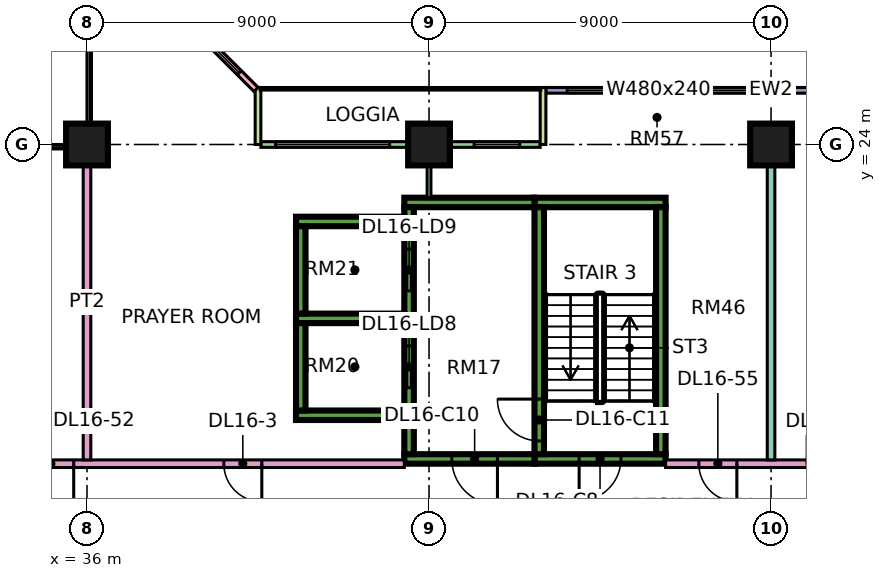
"""IFC4 building model, lengths in metres.
Left out: names, types, materials, properties, quantities, classifications, styles, units other than length and angle.
Written with IfcOpenShell. Run it as: python <this file> out.ifc"""

import sys

from ifc_helpers import new_model, si_unit, direction, frame, frame_2d, origin, origin_2d, place, context, subcontext, project, spatial, rectangle, extrude, element, fill, save


model = new_model("IFC4")
c1 = context("Model", 3, precision=1e-05, world=origin(), true_north=direction((0.0, 1.0)))
c2 = subcontext(c1, "Body", "Model", "MODEL_VIEW")
j1 = project(units=[si_unit("LENGTHUNIT", "METRE"), si_unit("PLANEANGLEUNIT", "RADIAN")], contexts=[c1])
p1 = place(None, origin())
s1 = spatial("IfcSite", under=j1, at=p1, CompositionType="ELEMENT")
p2 = place(p1, origin())
s2 = spatial("IfcBuilding", under=s1, at=p2, CompositionType="ELEMENT")
p3 = place(p2, frame((0.0, 0.0, 75.15)))
s3 = spatial("IfcBuildingStorey", under=s2, at=p3, CompositionType="ELEMENT", Elevation=75.15)
for number, where, z_axis, x_axis in (
    (1, (36.0, 24.0, 0.0), (0.0, 0.0, 1.0), (1.0, 0.0, 0.0)),
    (2, (45.0, 24.0, 0.0), (0.0, 0.0, 1.0), (1.0, 0.0, 0.0)),
    (3, (54.0, 24.0, 0.0), (0.0, 0.0, 1.0), (1.0, 0.0, 0.0)),
):
    element("IfcColumn", number, at=place(p3, frame(where, z_axis=z_axis, x_axis=x_axis)), inside=s3, PredefinedType="COLUMN", context=c2, shape_type="SweptSolid", body=[
        extrude(rectangle(XDim=1.1, YDim=1.1, at=origin_2d()), origin(), (0.0, 0.0, 1.0), 3.75),
    ])
p4 = place(p3, frame((47.775, 15.725, 0.0), z_axis=(0.0, 0.0, 1.0), x_axis=(1.0, 0.0, 0.0)))
e4 = element("IfcWall", 4, at=p4, inside=s3, PredefinedType="SHEAR", context=c2, shape_type="SweptSolid", body=[
    extrude(rectangle(XDim=3.45, YDim=0.25, at=frame_2d((1.725, 0.0))), origin(), (0.0, 0.0, 1.0), 3.75),
])
p5 = place(p4, frame((1.175, 0.0, 0.0)))
e5 = element("IfcOpeningElement", 5, at=p5, cuts=e4, PredefinedType="OPENING", context=c2, shape_type="SweptSolid", body=[
    extrude(rectangle(XDim=1.1, YDim=2.2, at=frame_2d((0.55, 1.1))), frame((0.0, 0.135, 0.0), z_axis=(0.0, -1.0, 0.0), x_axis=(1.0, 0.0, 0.0)), (0.0, 0.0, 1.0), 0.27),
])
p6 = place(p3, frame((47.775, 22.475, 0.0), z_axis=(0.0, 0.0, 1.0), x_axis=(1.0, 0.0, 0.0)))
e6 = element("IfcWall", 6, at=p6, inside=s3, PredefinedType="SHEAR", context=c2, shape_type="SweptSolid", body=[
    extrude(rectangle(XDim=3.45, YDim=0.25, at=frame_2d((1.725, 0.0))), origin(), (0.0, 0.0, 1.0), 3.75),
])
p7 = place(p3, frame((47.9, 15.85, 0.0), z_axis=(0.0, 0.0, 1.0), x_axis=(0.0, 1.0, 0.0)))
e7 = element("IfcWall", 7, at=p7, inside=s3, PredefinedType="SHEAR", context=c2, shape_type="SweptSolid", body=[
    extrude(rectangle(XDim=6.5, YDim=0.25, at=frame_2d((3.25, 0.0))), origin(), (0.0, 0.0, 1.0), 3.75),
])
p8 = place(p7, frame((0.35, 0.0, 0.0)))
e8 = element("IfcOpeningElement", 8, at=p8, cuts=e7, PredefinedType="OPENING", context=c2, shape_type="SweptSolid", body=[
    extrude(rectangle(XDim=1.1, YDim=2.2, at=frame_2d((0.55, 1.1))), frame((0.0, 0.135, 0.0), z_axis=(0.0, -1.0, 0.0), x_axis=(1.0, 0.0, 0.0)), (0.0, 0.0, 1.0), 0.27),
])
p9 = place(p3, frame((51.1, 15.85, 0.0), z_axis=(0.0, 0.0, 1.0), x_axis=(0.0, 1.0, 0.0)))
e9 = element("IfcWall", 9, at=p9, inside=s3, PredefinedType="SHEAR", context=c2, shape_type="SweptSolid", body=[
    extrude(rectangle(XDim=6.5, YDim=0.25, at=frame_2d((3.25, 0.0))), origin(), (0.0, 0.0, 1.0), 3.75),
])
p10 = place(p3, frame((44.35, 15.725, 0.0), z_axis=(0.0, 0.0, 1.0), x_axis=(1.0, 0.0, 0.0)))
e10 = element("IfcWall", 10, at=p10, inside=s3, PredefinedType="SHEAR", context=c2, shape_type="SweptSolid", body=[
    extrude(rectangle(XDim=3.425, YDim=0.25, at=frame_2d((1.712, 0.0))), origin(), (0.0, 0.0, 1.0), 3.75),
])
p11 = place(p10, frame((1.25, 0.0, 0.0)))
e11 = element("IfcOpeningElement", 11, at=p11, cuts=e10, PredefinedType="OPENING", context=c2, shape_type="SweptSolid", body=[
    extrude(rectangle(XDim=1.2, YDim=2.2, at=frame_2d((0.6, 1.1))), frame((0.0, 0.135, 0.0), z_axis=(0.0, -1.0, 0.0), x_axis=(1.0, 0.0, 0.0)), (0.0, 0.0, 1.0), 0.27),
])
p12 = place(p3, frame((44.35, 22.475, 0.0), z_axis=(0.0, 0.0, 1.0), x_axis=(1.0, 0.0, 0.0)))
e12 = element("IfcWall", 12, at=p12, inside=s3, PredefinedType="SHEAR", context=c2, shape_type="SweptSolid", body=[
    extrude(rectangle(XDim=3.425, YDim=0.25, at=frame_2d((1.712, 0.0))), origin(), (0.0, 0.0, 1.0), 3.75),
])
p13 = place(p3, frame((44.475, 15.85, 0.0), z_axis=(0.0, 0.0, 1.0), x_axis=(0.0, 1.0, 0.0)))
e13 = element("IfcWall", 13, at=p13, inside=s3, PredefinedType="SHEAR", context=c2, shape_type="SweptSolid", body=[
    extrude(rectangle(XDim=6.5, YDim=0.25, at=frame_2d((3.25, 0.0))), origin(), (0.0, 0.0, 1.0), 3.75),
])
p14 = place(p13, frame((1.75, 0.0, 0.0)))
e14 = element("IfcOpeningElement", 14, at=p14, cuts=e13, PredefinedType="OPENING", context=c2, shape_type="SweptSolid", body=[
    extrude(rectangle(XDim=1.1, YDim=2.2, at=frame_2d((0.55, 1.1))), frame((0.0, 0.135, 0.0), z_axis=(0.0, -1.0, 0.0), x_axis=(1.0, 0.0, 0.0)), (0.0, 0.0, 1.0), 0.27),
])
p15 = place(p13, frame((4.3, 0.0, 0.0)))
e15 = element("IfcOpeningElement", 15, at=p15, cuts=e13, PredefinedType="OPENING", context=c2, shape_type="SweptSolid", body=[
    extrude(rectangle(XDim=1.1, YDim=2.2, at=frame_2d((0.55, 1.1))), frame((0.0, 0.135, 0.0), z_axis=(0.0, -1.0, 0.0), x_axis=(1.0, 0.0, 0.0)), (0.0, 0.0, 1.0), 0.27),
])
for number, where, z_axis, x_axis in (
    (16, (41.5, 16.875, 0.0), (0.0, 0.0, 1.0), (1.0, 0.0, 0.0)),
    (17, (41.5, 19.425, 0.0), (0.0, 0.0, 1.0), (1.0, 0.0, 0.0)),
    (18, (41.5, 21.975, 0.0), (0.0, 0.0, 1.0), (1.0, 0.0, 0.0)),
):
    element("IfcWall", number, at=place(p3, frame(where, z_axis=z_axis, x_axis=x_axis)), inside=s3, PredefinedType="SHEAR", context=c2, shape_type="SweptSolid", body=[
        extrude(rectangle(XDim=2.85, YDim=0.25, at=frame_2d((1.425, 0.0))), origin(), (0.0, 0.0, 1.0), 3.75),
    ])
for number, where, z_axis, x_axis in (
    (19, (41.625, 17.0, 0.0), (0.0, 0.0, 1.0), (0.0, 1.0, 0.0)),
    (20, (41.625, 19.55, 0.0), (0.0, 0.0, 1.0), (0.0, 1.0, 0.0)),
):
    element("IfcWall", number, at=place(p3, frame(where, z_axis=z_axis, x_axis=x_axis)), inside=s3, PredefinedType="SHEAR", context=c2, shape_type="SweptSolid", body=[
        extrude(rectangle(XDim=2.3, YDim=0.25, at=frame_2d((1.15, 0.0))), origin(), (0.0, 0.0, 1.0), 3.75),
    ])
p16 = place(p3, frame((59.925, 25.425, 0.0), z_axis=(0.0, 0.0, 1.0), x_axis=(-1.0, 0.0, 0.0)))
e21 = element("IfcWall", 21, at=p16, inside=s3, PredefinedType="SOLIDWALL", context=c2, shape_type="SweptSolid", body=[
    extrude(rectangle(XDim=11.85, YDim=0.15, at=frame_2d((5.925, 0.0))), origin(), (0.0, 0.0, 1.0), 3.35),
])
p17 = place(p16, frame((1.462, 0.0, 0.45)))
e22 = element("IfcOpeningElement", 22, at=p17, cuts=e21, PredefinedType="OPENING", context=c2, shape_type="SweptSolid", body=[
    extrude(rectangle(XDim=3.0, YDim=2.4, at=frame_2d((1.5, 1.2))), frame((0.0, 0.085, 0.0), z_axis=(0.0, -1.0, 0.0), x_axis=(1.0, 0.0, 0.0)), (0.0, 0.0, 1.0), 0.17),
])
p18 = place(p16, frame((6.488, 0.0, 0.45)))
e23 = element("IfcOpeningElement", 23, at=p18, cuts=e21, PredefinedType="OPENING", context=c2, shape_type="SweptSolid", body=[
    extrude(rectangle(XDim=4.8, YDim=2.4, at=frame_2d((2.4, 1.2))), frame((0.0, 0.085, 0.0), z_axis=(0.0, -1.0, 0.0), x_axis=(1.0, 0.0, 0.0)), (0.0, 0.0, 1.0), 0.17),
])
p19 = place(p3, frame((47.925, 24.0, 0.0), z_axis=(0.0, 0.0, 1.0), x_axis=(-1.0, 0.0, 0.0)))
e24 = element("IfcWall", 24, at=p19, inside=s3, PredefinedType="SOLIDWALL", context=c2, shape_type="SweptSolid", body=[
    extrude(rectangle(XDim=7.35, YDim=0.15, at=frame_2d((3.675, 0.0))), origin(), (0.0, 0.0, 1.0), 3.35),
])
p20 = place(p19, frame((0.538, 0.0, 0.45)))
e25 = element("IfcOpeningElement", 25, at=p20, cuts=e24, PredefinedType="OPENING", context=c2, shape_type="SweptSolid", body=[
    extrude(rectangle(XDim=1.2, YDim=2.4, at=frame_2d((0.6, 1.2))), frame((0.0, 0.085, 0.0), z_axis=(0.0, -1.0, 0.0), x_axis=(1.0, 0.0, 0.0)), (0.0, 0.0, 1.0), 0.17),
])
p21 = place(p19, frame((3.962, 0.0, 0.45)))
e26 = element("IfcOpeningElement", 26, at=p21, cuts=e24, PredefinedType="OPENING", context=c2, shape_type="SweptSolid", body=[
    extrude(rectangle(XDim=3.0, YDim=2.4, at=frame_2d((1.5, 1.2))), frame((0.0, 0.085, 0.0), z_axis=(0.0, -1.0, 0.0), x_axis=(1.0, 0.0, 0.0)), (0.0, 0.0, 1.0), 0.17),
])
for number, where, z_axis, x_axis in (
    (27, (48.0, 25.5, 0.0), (0.0, 0.0, 1.0), (0.0, -1.0, 0.0)),
    (28, (40.5, 25.5, 0.0), (0.0, 0.0, 1.0), (0.0, -1.0, 0.0)),
):
    element("IfcWall", number, at=place(p3, frame(where, z_axis=z_axis, x_axis=x_axis)), inside=s3, PredefinedType="SOLIDWALL", context=c2, shape_type="SweptSolid", body=[
        extrude(rectangle(XDim=1.5, YDim=0.15, at=frame_2d((0.75, 0.0))), origin(), (0.0, 0.0, 1.0), 3.35),
    ])
p22 = place(p3, frame((40.447, 25.447, 0.0), z_axis=(0.0, 0.0, 1.0), x_axis=(-0.707106781187, 0.707106781187, 0.0)))
e29 = element("IfcWall", 29, at=p22, inside=s3, PredefinedType="SOLIDWALL", context=c2, shape_type="SweptSolid", body=[
    extrude(rectangle(XDim=4.243, YDim=0.15, at=frame_2d((2.121, 0.0))), origin(), (0.0, 0.0, 1.0), 3.35),
])
p23 = place(p22, frame((0.621, 0.0, 0.45)))
e30 = element("IfcOpeningElement", 30, at=p23, cuts=e29, PredefinedType="OPENING", context=c2, shape_type="SweptSolid", body=[
    extrude(rectangle(XDim=3.0, YDim=2.4, at=frame_2d((1.5, 1.2))), frame((0.0, 0.085, 0.0), z_axis=(0.0, -1.0, 0.0), x_axis=(1.0, 0.0, 0.0)), (0.0, 0.0, 1.0), 0.17),
])
p24 = place(p3, frame((34.0, 15.6, 0.0), z_axis=(0.0, 0.0, 1.0), x_axis=(1.0, 0.0, 0.0)))
e31 = element("IfcWall", 31, at=p24, inside=s3, PredefinedType="PARTITIONING", context=c2, shape_type="SweptSolid", body=[
    extrude(rectangle(XDim=10.35, YDim=0.2, at=frame_2d((5.175, 0.0))), origin(), (0.0, 0.0, 1.0), 3.35),
])
p25 = place(p24, frame((5.6, 0.0, 0.0)))
e32 = element("IfcOpeningElement", 32, at=p25, cuts=e31, PredefinedType="OPENING", context=c2, shape_type="SweptSolid", body=[
    extrude(rectangle(XDim=1.0, YDim=2.1, at=frame_2d((0.5, 1.05))), frame((0.0, 0.11, 0.0), z_axis=(0.0, -1.0, 0.0), x_axis=(1.0, 0.0, 0.0)), (0.0, 0.0, 1.0), 0.22),
])
p26 = place(p24, frame((0.45, 0.0, 0.0)))
e33 = element("IfcOpeningElement", 33, at=p26, cuts=e31, PredefinedType="OPENING", context=c2, shape_type="SweptSolid", body=[
    extrude(rectangle(XDim=1.2, YDim=2.1, at=frame_2d((0.6, 1.05))), frame((0.0, 0.11, 0.0), z_axis=(0.0, -1.0, 0.0), x_axis=(1.0, 0.0, 0.0)), (0.0, 0.0, 1.0), 0.22),
])
p27 = place(p3, frame((36.0, 15.7, 0.0), z_axis=(0.0, 0.0, 1.0), x_axis=(0.0, 1.0, 0.0)))
e34 = element("IfcWall", 34, at=p27, inside=s3, PredefinedType="PARTITIONING", context=c2, shape_type="SweptSolid", body=[
    extrude(rectangle(XDim=8.3, YDim=0.2, at=frame_2d((4.15, 0.0))), origin(), (0.0, 0.0, 1.0), 3.35),
])
p28 = place(p3, frame((45.0, 22.6, 0.0), z_axis=(0.0, 0.0, 1.0), x_axis=(0.0, 1.0, 0.0)))
e35 = element("IfcWall", 35, at=p28, inside=s3, PredefinedType="PARTITIONING", context=c2, shape_type="SweptSolid", body=[
    extrude(rectangle(XDim=1.326, YDim=0.1, at=frame_2d((0.663, 0.0))), origin(), (0.0, 0.0, 1.0), 3.35),
])
p29 = place(p3, frame((51.225, 15.6, 0.0), z_axis=(0.0, 0.0, 1.0), x_axis=(1.0, 0.0, 0.0)))
e36 = element("IfcWall", 36, at=p29, inside=s3, PredefinedType="PARTITIONING", context=c2, shape_type="SweptSolid", body=[
    extrude(rectangle(XDim=20.701, YDim=0.2, at=frame_2d((10.351, 0.0))), origin(), (0.0, 0.0, 1.0), 3.35),
])
p30 = place(p29, frame((3.725, 0.0, 0.0)))
e37 = element("IfcOpeningElement", 37, at=p30, cuts=e36, PredefinedType="OPENING", context=c2, shape_type="SweptSolid", body=[
    extrude(rectangle(XDim=1.0, YDim=2.1, at=frame_2d((0.5, 1.05))), frame((0.0, 0.11, 0.0), z_axis=(0.0, -1.0, 0.0), x_axis=(1.0, 0.0, 0.0)), (0.0, 0.0, 1.0), 0.22),
])
p31 = place(p29, frame((0.875, 0.0, 0.0)))
e38 = element("IfcOpeningElement", 38, at=p31, cuts=e36, PredefinedType="OPENING", context=c2, shape_type="SweptSolid", body=[
    extrude(rectangle(XDim=1.0, YDim=2.1, at=frame_2d((0.5, 1.05))), frame((0.0, 0.11, 0.0), z_axis=(0.0, -1.0, 0.0), x_axis=(1.0, 0.0, 0.0)), (0.0, 0.0, 1.0), 0.22),
])
p32 = place(p3, frame((54.0, 15.7, 0.0), z_axis=(0.0, 0.0, 1.0), x_axis=(0.0, 1.0, 0.0)))
e39 = element("IfcWall", 39, at=p32, inside=s3, PredefinedType="PARTITIONING", context=c2, shape_type="SweptSolid", body=[
    extrude(rectangle(XDim=8.3, YDim=0.2, at=frame_2d((4.15, 0.0))), origin(), (0.0, 0.0, 1.0), 3.35),
])
p33 = place(p18, origin())
e40 = element("IfcWindow", 40, at=p33, inside=s3, PartitioningType="SINGLE_PANEL", PredefinedType="WINDOW", context=c2, shape_type="SweptSolid", body=[
    extrude(rectangle(XDim=4.8, YDim=2.4, at=frame_2d((2.4, 1.2))), frame((0.0, 0.03, 0.0), z_axis=(0.0, -1.0, 0.0), x_axis=(1.0, 0.0, 0.0)), (0.0, 0.0, 1.0), 0.06),
])
fill(e23, e40)
p34 = place(p20, origin())
e41 = element("IfcWindow", 41, at=p34, inside=s3, PartitioningType="SINGLE_PANEL", PredefinedType="WINDOW", context=c2, shape_type="SweptSolid", body=[
    extrude(rectangle(XDim=1.2, YDim=2.4, at=frame_2d((0.6, 1.2))), frame((0.0, 0.03, 0.0), z_axis=(0.0, -1.0, 0.0), x_axis=(1.0, 0.0, 0.0)), (0.0, 0.0, 1.0), 0.06),
])
fill(e25, e41)
p35 = place(p21, origin())
e42 = element("IfcWindow", 42, at=p35, inside=s3, PartitioningType="SINGLE_PANEL", PredefinedType="WINDOW", context=c2, shape_type="SweptSolid", body=[
    extrude(rectangle(XDim=3.0, YDim=2.4, at=frame_2d((1.5, 1.2))), frame((0.0, 0.03, 0.0), z_axis=(0.0, -1.0, 0.0), x_axis=(1.0, 0.0, 0.0)), (0.0, 0.0, 1.0), 0.06),
])
fill(e26, e42)
p36 = place(p23, origin())
e43 = element("IfcWindow", 43, at=p36, inside=s3, PartitioningType="SINGLE_PANEL", PredefinedType="WINDOW", context=c2, shape_type="SweptSolid", body=[
    extrude(rectangle(XDim=3.0, YDim=2.4, at=frame_2d((1.5, 1.2))), frame((0.0, 0.03, 0.0), z_axis=(0.0, -1.0, 0.0), x_axis=(1.0, 0.0, 0.0)), (0.0, 0.0, 1.0), 0.06),
])
fill(e30, e43)
p37 = place(p5, frame((1.1, 0.0, 0.0), z_axis=(0.0, 0.0, 1.0), x_axis=(-1.0, 0.0, 0.0)))
e44 = element("IfcDoor", 44, at=p37, inside=s3, OperationType="SINGLE_SWING_LEFT", PredefinedType="DOOR", context=c2, shape_type="SweptSolid", body=[
    extrude(rectangle(XDim=1.1, YDim=2.2, at=frame_2d((0.55, 1.1))), frame((0.0, 0.025, 0.0), z_axis=(0.0, -1.0, 0.0), x_axis=(1.0, 0.0, 0.0)), (0.0, 0.0, 1.0), 0.05),
])
fill(e5, e44)
p38 = place(p11, origin())
e45 = element("IfcDoor", 45, at=p38, inside=s3, OperationType="SINGLE_SWING_RIGHT", PredefinedType="DOOR", context=c2, shape_type="SweptSolid", body=[
    extrude(rectangle(XDim=1.2, YDim=2.2, at=frame_2d((0.6, 1.1))), frame((0.0, 0.025, 0.0), z_axis=(0.0, -1.0, 0.0), x_axis=(1.0, 0.0, 0.0)), (0.0, 0.0, 1.0), 0.05),
])
fill(e11, e45)
p39 = place(p8, frame((1.1, 0.0, 0.0), z_axis=(0.0, 0.0, 1.0), x_axis=(-1.0, 0.0, 0.0)))
e46 = element("IfcDoor", 46, at=p39, inside=s3, OperationType="SINGLE_SWING_RIGHT", PredefinedType="DOOR", context=c2, shape_type="SweptSolid", body=[
    extrude(rectangle(XDim=1.1, YDim=2.2, at=frame_2d((0.55, 1.1))), frame((0.0, 0.025, 0.0), z_axis=(0.0, -1.0, 0.0), x_axis=(1.0, 0.0, 0.0)), (0.0, 0.0, 1.0), 0.05),
])
fill(e8, e46)
p40 = place(p14, origin())
e47 = element("IfcDoor", 47, at=p40, inside=s3, OperationType="DOUBLE_DOOR_SLIDING", PredefinedType="DOOR", context=c2, shape_type="SweptSolid", body=[
    extrude(rectangle(XDim=1.1, YDim=2.2, at=frame_2d((0.55, 1.1))), frame((0.0, 0.025, 0.0), z_axis=(0.0, -1.0, 0.0), x_axis=(1.0, 0.0, 0.0)), (0.0, 0.0, 1.0), 0.05),
])
fill(e14, e47)
p41 = place(p15, origin())
e48 = element("IfcDoor", 48, at=p41, inside=s3, OperationType="DOUBLE_DOOR_SLIDING", PredefinedType="DOOR", context=c2, shape_type="SweptSolid", body=[
    extrude(rectangle(XDim=1.1, YDim=2.2, at=frame_2d((0.55, 1.1))), frame((0.0, 0.025, 0.0), z_axis=(0.0, -1.0, 0.0), x_axis=(1.0, 0.0, 0.0)), (0.0, 0.0, 1.0), 0.05),
])
fill(e15, e48)
p42 = place(p25, origin())
e49 = element("IfcDoor", 49, at=p42, inside=s3, OperationType="SINGLE_SWING_RIGHT", PredefinedType="DOOR", context=c2, shape_type="SweptSolid", body=[
    extrude(rectangle(XDim=1.0, YDim=2.1, at=frame_2d((0.5, 1.05))), frame((0.0, 0.025, 0.0), z_axis=(0.0, -1.0, 0.0), x_axis=(1.0, 0.0, 0.0)), (0.0, 0.0, 1.0), 0.05),
])
fill(e32, e49)
p43 = place(p26, origin())
e50 = element("IfcDoor", 50, at=p43, inside=s3, OperationType="SINGLE_SWING_RIGHT", PredefinedType="DOOR", context=c2, shape_type="SweptSolid", body=[
    extrude(rectangle(XDim=1.2, YDim=2.1, at=frame_2d((0.6, 1.05))), frame((0.0, 0.025, 0.0), z_axis=(0.0, -1.0, 0.0), x_axis=(1.0, 0.0, 0.0)), (0.0, 0.0, 1.0), 0.05),
])
fill(e33, e50)
p44 = place(p31, origin())
e51 = element("IfcDoor", 51, at=p44, inside=s3, OperationType="SINGLE_SWING_RIGHT", PredefinedType="DOOR", context=c2, shape_type="SweptSolid", body=[
    extrude(rectangle(XDim=1.0, YDim=2.1, at=frame_2d((0.5, 1.05))), frame((0.0, 0.025, 0.0), z_axis=(0.0, -1.0, 0.0), x_axis=(1.0, 0.0, 0.0)), (0.0, 0.0, 1.0), 0.05),
])
fill(e38, e51)
save(model, sys.argv[1])
